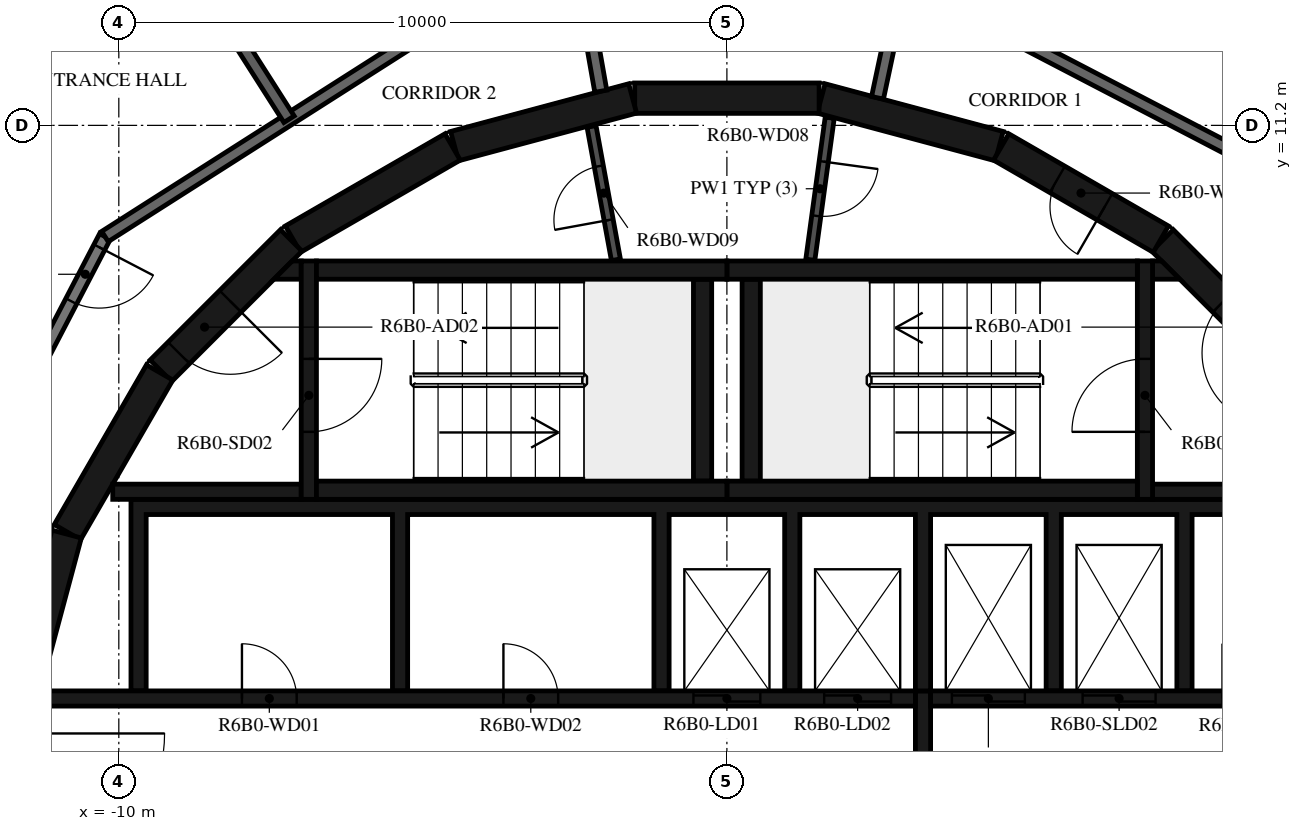
"""IFC4 building model, lengths in metres.
Left out: names, types, materials, properties, quantities, classifications, styles, units other than length and angle.
Written with IfcOpenShell. Run it as: python <this file> out.ifc"""

import sys

from ifc_helpers import new_model, si_unit, direction, frame, frame_2d, origin, place, context, subcontext, project, spatial, polyline, rectangle, outline, extrude, element, fill, save


model = new_model("IFC4")
c1 = context("Model", 3, precision=1e-05, world=origin(), true_north=direction((0.0, 1.0)))
c2 = subcontext(c1, "Body", "Model", "MODEL_VIEW")
j1 = project(units=[si_unit("LENGTHUNIT", "METRE"), si_unit("PLANEANGLEUNIT", "RADIAN")], contexts=[c1])
p1 = place(None, origin())
s1 = spatial("IfcSite", under=j1, at=p1, CompositionType="ELEMENT")
p2 = place(p1, origin())
s2 = spatial("IfcBuilding", under=s1, at=p2, CompositionType="ELEMENT")
p3 = place(p2, frame((0.0, 0.0, 240.7)))
s3 = spatial("IfcBuildingStorey", under=s2, at=p3, CompositionType="ELEMENT", Elevation=240.7)
p4 = place(p3, frame((9.308, 7.164, 0.0), z_axis=(0.0, 0.0, 1.0), x_axis=(-0.707106781187, 0.707106781187, 0.0)))
e1 = element("IfcWall", 1, at=p4, inside=s3, PredefinedType="SHEAR", context=c2, shape_type="SweptSolid", body=[
    extrude(rectangle(XDim=3.032, YDim=0.5, at=frame_2d((1.516, 0.0))), origin(), (0.0, 0.0, 1.0), 3.12),
])
p5 = place(p4, frame((0.416, 0.0, 0.0)))
e2 = element("IfcOpeningElement", 2, at=p5, cuts=e1, PredefinedType="OPENING", context=c2, shape_type="SweptSolid", body=[
    extrude(rectangle(XDim=1.2, YDim=2.1, at=frame_2d((0.6, 1.05))), frame((0.0, 0.26, 0.0), z_axis=(0.0, -1.0, 0.0), x_axis=(1.0, 0.0, 0.0)), (0.0, 0.0, 1.0), 0.52),
])
p6 = place(p3, frame((7.137, 9.329, 0.0), z_axis=(0.0, 0.0, 1.0), x_axis=(-0.865975092491, 0.500087131594, 0.0)))
e3 = element("IfcWall", 3, at=p6, inside=s3, PredefinedType="SHEAR", context=c2, shape_type="SweptSolid", body=[
    extrude(rectangle(XDim=3.033, YDim=0.5, at=frame_2d((1.516, 0.0))), origin(), (0.0, 0.0, 1.0), 3.12),
])
p7 = place(p6, frame((1.066, 0.0, 0.0)))
e4 = element("IfcOpeningElement", 4, at=p7, cuts=e3, PredefinedType="OPENING", context=c2, shape_type="SweptSolid", body=[
    extrude(rectangle(XDim=0.9, YDim=2.1, at=frame_2d((0.45, 1.05))), frame((0.0, 0.26, 0.0), z_axis=(0.0, -1.0, 0.0), x_axis=(1.0, 0.0, 0.0)), (0.0, 0.0, 1.0), 0.52),
])
for number, where, z_axis, x_axis in (
    (5, (4.479, 10.858, 0.0), (0.0, 0.0, 1.0), (-0.966, 0.259, 0.0)),
    (6, (1.516, 11.647, 0.0), (0.0, 0.0, 1.0), (-1.0, 0.0, 0.0)),
    (7, (-1.55, 11.643, 0.0), (0.0, 0.0, 1.0), (-0.966, -0.259, 0.0)),
    (8, (-4.51, 10.845, 0.0), (0.0, 0.0, 1.0), (-0.866, -0.5, 0.0)),
):
    element("IfcWall", number, at=place(p3, frame(where, z_axis=z_axis, x_axis=x_axis)), inside=s3, PredefinedType="SHEAR", context=c2, shape_type="SweptSolid", body=[
        extrude(rectangle(XDim=3.033, YDim=0.5, at=frame_2d((1.516, 0.0))), origin(), (0.0, 0.0, 1.0), 3.12),
    ])
p8 = place(p3, frame((-7.164, 9.308, 0.0), z_axis=(0.0, 0.0, 1.0), x_axis=(-0.707106781187, -0.707106781187, 0.0)))
e9 = element("IfcWall", 9, at=p8, inside=s3, PredefinedType="SHEAR", context=c2, shape_type="SweptSolid", body=[
    extrude(rectangle(XDim=3.032, YDim=0.5, at=frame_2d((1.516, 0.0))), origin(), (0.0, 0.0, 1.0), 3.12),
])
p9 = place(p8, frame((1.416, 0.0, 0.0)))
e10 = element("IfcOpeningElement", 10, at=p9, cuts=e9, PredefinedType="OPENING", context=c2, shape_type="SweptSolid", body=[
    extrude(rectangle(XDim=1.2, YDim=2.1, at=frame_2d((0.6, 1.05))), frame((0.0, 0.26, 0.0), z_axis=(0.0, -1.0, 0.0), x_axis=(1.0, 0.0, 0.0)), (0.0, 0.0, 1.0), 0.52),
])
for number, where, z_axis, x_axis in (
    (11, (-9.329, 7.137, 0.0), (0.0, 0.0, 1.0), (-0.5, -0.866, 0.0)),
    (12, (-10.858, 4.479, 0.0), (0.0, 0.0, 1.0), (-0.259, -0.966, 0.0)),
):
    element("IfcWall", number, at=place(p3, frame(where, z_axis=z_axis, x_axis=x_axis)), inside=s3, PredefinedType="SHEAR", context=c2, shape_type="SweptSolid", body=[
        extrude(rectangle(XDim=3.033, YDim=0.5, at=frame_2d((1.516, 0.0))), origin(), (0.0, 0.0, 1.0), 3.12),
    ])
for number, where, z_axis, x_axis in (
    (13, (0.0, 5.2, 0.0), (0.0, 0.0, 1.0), (1.0, 0.0, 0.0)),
    (14, (0.0, 8.82, 0.0), (0.0, 0.0, 1.0), (1.0, 0.0, 0.0)),
):
    element("IfcWall", number, at=place(p3, frame(where, z_axis=z_axis, x_axis=x_axis)), inside=s3, PredefinedType="SHEAR", context=c2, shape_type="SweptSolid", body=[
        extrude(rectangle(XDim=6.75, YDim=0.3, at=frame_2d((3.375, 0.0))), origin(), (0.0, 0.0, 1.0), 3.12),
    ])
p10 = place(p3, frame((0.4, 5.35, 0.0), z_axis=(0.0, 0.0, 1.0), x_axis=(0.0, 1.0, 0.0)))
e15 = element("IfcWall", 15, at=p10, inside=s3, PredefinedType="SHEAR", context=c2, shape_type="SweptSolid", body=[
    extrude(rectangle(XDim=3.32, YDim=0.3, at=frame_2d((1.66, 0.0))), origin(), (0.0, 0.0, 1.0), 3.12),
])
p11 = place(p3, frame((6.875, 5.05, 0.0), z_axis=(0.0, 0.0, 1.0), x_axis=(0.0, 1.0, 0.0)))
e16 = element("IfcWall", 16, at=p11, inside=s3, PredefinedType="SHEAR", context=c2, shape_type="SweptSolid", body=[
    extrude(rectangle(XDim=3.92, YDim=0.25, at=frame_2d((1.96, 0.0))), origin(), (0.0, 0.0, 1.0), 3.12),
])
p12 = place(p11, frame((1.11, 0.0, 0.0)))
e17 = element("IfcOpeningElement", 17, at=p12, cuts=e16, PredefinedType="OPENING", context=c2, shape_type="SweptSolid", body=[
    extrude(rectangle(XDim=1.2, YDim=2.1, at=frame_2d((0.6, 1.05))), frame((0.0, 0.135, 0.0), z_axis=(0.0, -1.0, 0.0), x_axis=(1.0, 0.0, 0.0)), (0.0, 0.0, 1.0), 0.27),
])
p13 = place(p3, frame((7.0, 5.175, 0.0), z_axis=(0.0, 0.0, 1.0), x_axis=(1.0, 0.0, 0.0)))
e18 = element("IfcWall", 18, at=p13, inside=s3, PredefinedType="SHEAR", context=c2, shape_type="SweptSolid", body=[
    extrude(rectangle(XDim=3.1, YDim=0.25, at=frame_2d((1.55, 0.0))), origin(), (0.0, 0.0, 1.0), 3.12),
])
p14 = place(p3, origin())
e19 = element("IfcWall", 19, at=p14, inside=s3, PredefinedType="SHEAR", context=c2, shape_type="SweptSolid", body=[
    extrude(outline(polyline([(7.448, 8.67), (7.0, 8.67), (7.0, 8.97), (7.148, 8.97), (7.448, 8.67)])), origin(), (0.0, 0.0, 1.0), 3.12),
])
for number, where, z_axis, x_axis in (
    (20, (-6.75, 5.2, 0.0), (0.0, 0.0, 1.0), (1.0, 0.0, 0.0)),
    (21, (-6.75, 8.82, 0.0), (0.0, 0.0, 1.0), (1.0, 0.0, 0.0)),
):
    element("IfcWall", number, at=place(p3, frame(where, z_axis=z_axis, x_axis=x_axis)), inside=s3, PredefinedType="SHEAR", context=c2, shape_type="SweptSolid", body=[
        extrude(rectangle(XDim=6.75, YDim=0.3, at=frame_2d((3.375, 0.0))), origin(), (0.0, 0.0, 1.0), 3.12),
    ])
p15 = place(p3, frame((-0.4, 5.35, 0.0), z_axis=(0.0, 0.0, 1.0), x_axis=(0.0, 1.0, 0.0)))
e22 = element("IfcWall", 22, at=p15, inside=s3, PredefinedType="SHEAR", context=c2, shape_type="SweptSolid", body=[
    extrude(rectangle(XDim=3.32, YDim=0.3, at=frame_2d((1.66, 0.0))), origin(), (0.0, 0.0, 1.0), 3.12),
])
p16 = place(p3, frame((-6.875, 8.97, 0.0), z_axis=(0.0, 0.0, 1.0), x_axis=(0.0, -1.0, 0.0)))
e23 = element("IfcWall", 23, at=p16, inside=s3, PredefinedType="SHEAR", context=c2, shape_type="SweptSolid", body=[
    extrude(rectangle(XDim=3.92, YDim=0.25, at=frame_2d((1.96, 0.0))), origin(), (0.0, 0.0, 1.0), 3.12),
])
p17 = place(p16, frame((1.61, 0.0, 0.0)))
e24 = element("IfcOpeningElement", 24, at=p17, cuts=e23, PredefinedType="OPENING", context=c2, shape_type="SweptSolid", body=[
    extrude(rectangle(XDim=1.2, YDim=2.1, at=frame_2d((0.6, 1.05))), frame((0.0, 0.135, 0.0), z_axis=(0.0, -1.0, 0.0), x_axis=(1.0, 0.0, 0.0)), (0.0, 0.0, 1.0), 0.27),
])
p18 = place(p3, frame((-7.0, 5.175, 0.0), z_axis=(0.0, 0.0, 1.0), x_axis=(-1.0, 0.0, 0.0)))
e25 = element("IfcWall", 25, at=p18, inside=s3, PredefinedType="SHEAR", context=c2, shape_type="SweptSolid", body=[
    extrude(rectangle(XDim=3.1, YDim=0.25, at=frame_2d((1.55, 0.0))), origin(), (0.0, 0.0, 1.0), 3.12),
])
p19 = place(p3, origin())
e26 = element("IfcWall", 26, at=p19, inside=s3, PredefinedType="SHEAR", context=c2, shape_type="SweptSolid", body=[
    extrude(outline(polyline([(-7.148, 8.97), (-7.0, 8.97), (-7.0, 8.67), (-7.448, 8.67), (-7.148, 8.97)])), origin(), (0.0, 0.0, 1.0), 3.12),
])
p20 = place(p3, origin())
e27 = element("IfcWall", 27, at=p20, inside=s3, PredefinedType="SHEAR", context=c2, shape_type="SweptSolid", body=[
    extrude(outline(polyline([(-9.55, 4.8), (-5.5, 4.8), (-5.5, 1.9), (-5.25, 1.9), (-5.25, 4.8), (-1.2, 4.8), (-1.2, 1.9), (-0.95, 1.9), (-0.95, 4.8), (0.95, 4.8), (0.95, 1.9), (1.2, 1.9), (1.2, 4.8), (3.1, 4.8), (3.1, 1.9), (3.35, 1.9), (3.35, 4.8), (5.25, 4.8), (5.25, 1.9), (5.5, 1.9), (5.5, 4.8), (7.4, 4.8), (7.4, 1.9), (7.65, 1.9), (7.65, 4.8), (9.55, 4.8), (9.55, 1.9), (9.8, 1.9), (9.8, 4.8), (9.8, 5.05), (-9.8, 5.05), (-9.8, 4.8), (-9.8, 1.9), (-9.55, 1.9), (-9.55, 4.8)])), origin(), (0.0, 0.0, 1.0), 3.12),
])
p21 = place(p3, frame((-11.28, 1.775, 0.0), z_axis=(0.0, 0.0, 1.0), x_axis=(1.0, 0.0, 0.0)))
e28 = element("IfcWall", 28, at=p21, inside=s3, PredefinedType="SHEAR", context=c2, shape_type="SweptSolid", body=[
    extrude(rectangle(XDim=14.38, YDim=0.25, at=frame_2d((7.19, 0.0))), origin(), (0.0, 0.0, 1.0), 3.12),
])
p22 = place(p21, frame((10.73, 0.0, 0.0)))
e29 = element("IfcOpeningElement", 29, at=p22, cuts=e28, PredefinedType="OPENING", context=c2, shape_type="SweptSolid", body=[
    extrude(rectangle(XDim=1.1, YDim=2.1, at=frame_2d((0.55, 1.05))), frame((0.0, 0.135, 0.0), z_axis=(0.0, -1.0, 0.0), x_axis=(1.0, 0.0, 0.0)), (0.0, 0.0, 1.0), 0.27),
])
p23 = place(p21, frame((12.88, 0.0, 0.0)))
e30 = element("IfcOpeningElement", 30, at=p23, cuts=e28, PredefinedType="OPENING", context=c2, shape_type="SweptSolid", body=[
    extrude(rectangle(XDim=1.1, YDim=2.1, at=frame_2d((0.55, 1.05))), frame((0.0, 0.135, 0.0), z_axis=(0.0, -1.0, 0.0), x_axis=(1.0, 0.0, 0.0)), (0.0, 0.0, 1.0), 0.27),
])
p24 = place(p21, frame((3.305, 0.0, 0.0)))
e31 = element("IfcOpeningElement", 31, at=p24, cuts=e28, PredefinedType="OPENING", context=c2, shape_type="SweptSolid", body=[
    extrude(rectangle(XDim=0.9, YDim=2.1, at=frame_2d((0.45, 1.05))), frame((0.0, 0.135, 0.0), z_axis=(0.0, -1.0, 0.0), x_axis=(1.0, 0.0, 0.0)), (0.0, 0.0, 1.0), 0.27),
])
p25 = place(p21, frame((7.605, 0.0, 0.0)))
e32 = element("IfcOpeningElement", 32, at=p25, cuts=e28, PredefinedType="OPENING", context=c2, shape_type="SweptSolid", body=[
    extrude(rectangle(XDim=0.9, YDim=2.1, at=frame_2d((0.45, 1.05))), frame((0.0, 0.135, 0.0), z_axis=(0.0, -1.0, 0.0), x_axis=(1.0, 0.0, 0.0)), (0.0, 0.0, 1.0), 0.27),
])
p26 = place(p3, frame((3.35, 1.775, 0.0), z_axis=(0.0, 0.0, 1.0), x_axis=(1.0, 0.0, 0.0)))
e33 = element("IfcWall", 33, at=p26, inside=s3, PredefinedType="SHEAR", context=c2, shape_type="SweptSolid", body=[
    extrude(rectangle(XDim=7.93, YDim=0.25, at=frame_2d((3.965, 0.0))), origin(), (0.0, 0.0, 1.0), 3.12),
])
p27 = place(p26, frame((0.35, 0.0, 0.0)))
e34 = element("IfcOpeningElement", 34, at=p27, cuts=e33, PredefinedType="OPENING", context=c2, shape_type="SweptSolid", body=[
    extrude(rectangle(XDim=1.2, YDim=2.4, at=frame_2d((0.6, 1.2))), frame((0.0, 0.135, 0.0), z_axis=(0.0, -1.0, 0.0), x_axis=(1.0, 0.0, 0.0)), (0.0, 0.0, 1.0), 0.27),
])
p28 = place(p26, frame((2.5, 0.0, 0.0)))
e35 = element("IfcOpeningElement", 35, at=p28, cuts=e33, PredefinedType="OPENING", context=c2, shape_type="SweptSolid", body=[
    extrude(rectangle(XDim=1.2, YDim=2.4, at=frame_2d((0.6, 1.2))), frame((0.0, 0.135, 0.0), z_axis=(0.0, -1.0, 0.0), x_axis=(1.0, 0.0, 0.0)), (0.0, 0.0, 1.0), 0.27),
])
p29 = place(p26, frame((4.8, 0.0, 0.0)))
e36 = element("IfcOpeningElement", 36, at=p29, cuts=e33, PredefinedType="OPENING", context=c2, shape_type="SweptSolid", body=[
    extrude(rectangle(XDim=0.9, YDim=2.1, at=frame_2d((0.45, 1.05))), frame((0.0, 0.135, 0.0), z_axis=(0.0, -1.0, 0.0), x_axis=(1.0, 0.0, 0.0)), (0.0, 0.0, 1.0), 0.27),
])
p30 = place(p3, frame((3.225, -1.9, 0.0), z_axis=(0.0, 0.0, 1.0), x_axis=(0.0, 1.0, 0.0)))
e37 = element("IfcWall", 37, at=p30, inside=s3, PredefinedType="SHEAR", context=c2, shape_type="SweptSolid", body=[
    extrude(rectangle(XDim=3.8, YDim=0.25, at=frame_2d((1.9, 0.0))), origin(), (0.0, 0.0, 1.0), 3.12),
])
p31 = place(p3, frame((1.691, 11.326, 0.0), z_axis=(0.0, 0.0, 1.0), x_axis=(-0.135344253201, -0.990798633994, 0.0)))
e38 = element("IfcWall", 38, at=p31, inside=s3, PredefinedType="PARTITIONING", context=c2, shape_type="SweptSolid", body=[
    extrude(rectangle(XDim=2.358, YDim=0.15, at=frame_2d((1.179, 0.0))), origin(), (0.0, 0.0, 1.0), 3.12),
])
p32 = place(p31, frame((0.729, 0.0, 0.0)))
e39 = element("IfcOpeningElement", 39, at=p32, cuts=e38, PredefinedType="OPENING", context=c2, shape_type="SweptSolid", body=[
    extrude(rectangle(XDim=0.9, YDim=2.1, at=frame_2d((0.45, 1.05))), frame((0.0, 0.085, 0.0), z_axis=(0.0, -1.0, 0.0), x_axis=(1.0, 0.0, 0.0)), (0.0, 0.0, 1.0), 0.17),
])
p33 = place(p3, frame((-1.825, 8.99, 0.0), z_axis=(0.0, 0.0, 1.0), x_axis=(-0.179955206115, 0.983674805915, 0.0)))
e40 = element("IfcWall", 40, at=p33, inside=s3, PredefinedType="PARTITIONING", context=c2, shape_type="SweptSolid", body=[
    extrude(rectangle(XDim=2.229, YDim=0.15, at=frame_2d((1.115, 0.0))), origin(), (0.0, 0.0, 1.0), 3.12),
])
p34 = place(p33, frame((0.665, 0.0, 0.0)))
e41 = element("IfcOpeningElement", 41, at=p34, cuts=e40, PredefinedType="OPENING", context=c2, shape_type="SweptSolid", body=[
    extrude(rectangle(XDim=0.9, YDim=2.1, at=frame_2d((0.45, 1.05))), frame((0.0, 0.085, 0.0), z_axis=(0.0, -1.0, 0.0), x_axis=(1.0, 0.0, 0.0)), (0.0, 0.0, 1.0), 0.17),
])
p35 = place(p3, frame((9.372, 10.228, 0.0), z_axis=(0.0, 0.0, 1.0), x_axis=(-0.887005184532, 0.461759464021, 0.0)))
e42 = element("IfcWall", 42, at=p35, inside=s3, PredefinedType="STANDARD", context=c2, shape_type="SweptSolid", body=[
    extrude(rectangle(XDim=7.181, YDim=0.2, at=frame_2d((3.591, 0.0))), origin(), (0.0, 0.0, 1.0), 3.12),
])
p36 = place(p3, frame((2.878, 13.538, 0.0), z_axis=(0.0, 0.0, 1.0), x_axis=(-0.207893604596, -0.978151444904, 0.0)))
e43 = element("IfcWall", 43, at=p36, inside=s3, PredefinedType="STANDARD", context=c2, shape_type="SweptSolid", body=[
    extrude(rectangle(XDim=1.927, YDim=0.2, at=frame_2d((0.963, 0.0))), origin(), (0.0, 0.0, 1.0), 3.12),
])
p37 = place(p3, frame((-10.228, 9.372, 0.0), z_axis=(0.0, 0.0, 1.0), x_axis=(-0.461759464021, -0.887005184532, 0.0)))
e44 = element("IfcWall", 44, at=p37, inside=s3, PredefinedType="STANDARD", context=c2, shape_type="SweptSolid", body=[
    extrude(rectangle(XDim=7.181, YDim=0.2, at=frame_2d((3.591, 0.0))), origin(), (0.0, 0.0, 1.0), 3.12),
])
p38 = place(p37, frame((0.2, 0.0, 0.0)))
e45 = element("IfcOpeningElement", 45, at=p38, cuts=e44, PredefinedType="OPENING", context=c2, shape_type="SweptSolid", body=[
    extrude(rectangle(XDim=1.0, YDim=2.1, at=frame_2d((0.5, 1.05))), frame((0.0, 0.11, 0.0), z_axis=(0.0, -1.0, 0.0), x_axis=(1.0, 0.0, 0.0)), (0.0, 0.0, 1.0), 0.22),
])
p39 = place(p3, frame((-2.074, 11.761, 0.0), z_axis=(0.0, 0.0, 1.0), x_axis=(-0.173679082312, 0.984802303189, 0.0)))
e46 = element("IfcWall", 46, at=p39, inside=s3, PredefinedType="STANDARD", context=c2, shape_type="SweptSolid", body=[
    extrude(rectangle(XDim=1.573, YDim=0.2, at=frame_2d((0.787, 0.0))), origin(), (0.0, 0.0, 1.0), 3.12),
])
p40 = place(p3, frame((-4.172, 13.231, 0.0), z_axis=(0.0, 0.0, 1.0), x_axis=(-0.843388394728, -0.537304397561, 0.0)))
e47 = element("IfcWall", 47, at=p40, inside=s3, PredefinedType="STANDARD", context=c2, shape_type="SweptSolid", body=[
    extrude(rectangle(XDim=7.181, YDim=0.2, at=frame_2d((3.59, 0.0))), origin(), (0.0, 0.0, 1.0), 3.12),
])
p41 = place(p3, frame((-9.645, 15.138, 0.0), z_axis=(0.0, 0.0, 1.0), x_axis=(0.537267800866, -0.84341170857, 0.0)))
e48 = element("IfcWall", 48, at=p41, inside=s3, PredefinedType="STANDARD", context=c2, shape_type="SweptSolid", body=[
    extrude(rectangle(XDim=4.55, YDim=0.2, at=frame_2d((2.275, 0.0))), origin(), (0.0, 0.0, 1.0), 3.12),
])
p42 = place(p3, frame((10.421, 11.373, 0.0), z_axis=(0.0, 0.0, 1.0), x_axis=(-0.887012970857, 0.461744506769, 0.0)))
e49 = element("IfcWall", 49, at=p42, inside=s3, PredefinedType="PARTITIONING", context=c2, shape_type="SweptSolid", body=[
    extrude(rectangle(XDim=7.985, YDim=0.12, at=frame_2d((3.992, 0.0))), origin(), (0.0, 0.0, 1.0), 3.12),
])
p43 = place(p12, origin())
e50 = element("IfcDoor", 50, at=p43, inside=s3, OperationType="SINGLE_SWING_LEFT", PredefinedType="DOOR", context=c2, shape_type="SweptSolid", body=[
    extrude(rectangle(XDim=1.2, YDim=2.1, at=frame_2d((0.6, 1.05))), frame((0.0, 0.025, 0.0), z_axis=(0.0, -1.0, 0.0), x_axis=(1.0, 0.0, 0.0)), (0.0, 0.0, 1.0), 0.05),
])
fill(e17, e50)
p44 = place(p5, origin())
e51 = element("IfcDoor", 51, at=p44, inside=s3, OperationType="SINGLE_SWING_RIGHT", PredefinedType="DOOR", context=c2, shape_type="SweptSolid", body=[
    extrude(rectangle(XDim=1.2, YDim=2.1, at=frame_2d((0.6, 1.05))), frame((0.0, 0.025, 0.0), z_axis=(0.0, -1.0, 0.0), x_axis=(1.0, 0.0, 0.0)), (0.0, 0.0, 1.0), 0.05),
])
fill(e2, e51)
p45 = place(p17, origin())
e52 = element("IfcDoor", 52, at=p45, inside=s3, OperationType="SINGLE_SWING_LEFT", PredefinedType="DOOR", context=c2, shape_type="SweptSolid", body=[
    extrude(rectangle(XDim=1.2, YDim=2.1, at=frame_2d((0.6, 1.05))), frame((0.0, 0.025, 0.0), z_axis=(0.0, -1.0, 0.0), x_axis=(1.0, 0.0, 0.0)), (0.0, 0.0, 1.0), 0.05),
])
fill(e24, e52)
p46 = place(p9, origin())
e53 = element("IfcDoor", 53, at=p46, inside=s3, OperationType="SINGLE_SWING_RIGHT", PredefinedType="DOOR", context=c2, shape_type="SweptSolid", body=[
    extrude(rectangle(XDim=1.2, YDim=2.1, at=frame_2d((0.6, 1.05))), frame((0.0, 0.025, 0.0), z_axis=(0.0, -1.0, 0.0), x_axis=(1.0, 0.0, 0.0)), (0.0, 0.0, 1.0), 0.05),
])
fill(e10, e53)
p47 = place(p22, origin())
e54 = element("IfcDoor", 54, at=p47, inside=s3, OperationType="DOUBLE_DOOR_SLIDING", PredefinedType="DOOR", context=c2, shape_type="SweptSolid", body=[
    extrude(rectangle(XDim=1.1, YDim=2.1, at=frame_2d((0.55, 1.05))), frame((0.0, 0.025, 0.0), z_axis=(0.0, -1.0, 0.0), x_axis=(1.0, 0.0, 0.0)), (0.0, 0.0, 1.0), 0.05),
])
fill(e29, e54)
p48 = place(p23, origin())
e55 = element("IfcDoor", 55, at=p48, inside=s3, OperationType="DOUBLE_DOOR_SLIDING", PredefinedType="DOOR", context=c2, shape_type="SweptSolid", body=[
    extrude(rectangle(XDim=1.1, YDim=2.1, at=frame_2d((0.55, 1.05))), frame((0.0, 0.025, 0.0), z_axis=(0.0, -1.0, 0.0), x_axis=(1.0, 0.0, 0.0)), (0.0, 0.0, 1.0), 0.05),
])
fill(e30, e55)
p49 = place(p27, origin())
e56 = element("IfcDoor", 56, at=p49, inside=s3, OperationType="DOUBLE_DOOR_SLIDING", PredefinedType="DOOR", context=c2, shape_type="SweptSolid", body=[
    extrude(rectangle(XDim=1.2, YDim=2.4, at=frame_2d((0.6, 1.2))), frame((0.0, 0.025, 0.0), z_axis=(0.0, -1.0, 0.0), x_axis=(1.0, 0.0, 0.0)), (0.0, 0.0, 1.0), 0.05),
])
fill(e34, e56)
p50 = place(p28, origin())
e57 = element("IfcDoor", 57, at=p50, inside=s3, OperationType="DOUBLE_DOOR_SLIDING", PredefinedType="DOOR", context=c2, shape_type="SweptSolid", body=[
    extrude(rectangle(XDim=1.2, YDim=2.4, at=frame_2d((0.6, 1.2))), frame((0.0, 0.025, 0.0), z_axis=(0.0, -1.0, 0.0), x_axis=(1.0, 0.0, 0.0)), (0.0, 0.0, 1.0), 0.05),
])
fill(e35, e57)
p51 = place(p24, origin())
e58 = element("IfcDoor", 58, at=p51, inside=s3, OperationType="SINGLE_SWING_LEFT", PredefinedType="DOOR", context=c2, shape_type="SweptSolid", body=[
    extrude(rectangle(XDim=0.9, YDim=2.1, at=frame_2d((0.45, 1.05))), frame((0.0, 0.025, 0.0), z_axis=(0.0, -1.0, 0.0), x_axis=(1.0, 0.0, 0.0)), (0.0, 0.0, 1.0), 0.05),
])
fill(e31, e58)
p52 = place(p25, origin())
e59 = element("IfcDoor", 59, at=p52, inside=s3, OperationType="SINGLE_SWING_RIGHT", PredefinedType="DOOR", context=c2, shape_type="SweptSolid", body=[
    extrude(rectangle(XDim=0.9, YDim=2.1, at=frame_2d((0.45, 1.05))), frame((0.0, 0.025, 0.0), z_axis=(0.0, -1.0, 0.0), x_axis=(1.0, 0.0, 0.0)), (0.0, 0.0, 1.0), 0.05),
])
fill(e32, e59)
p53 = place(p32, origin())
e60 = element("IfcDoor", 60, at=p53, inside=s3, OperationType="SINGLE_SWING_RIGHT", PredefinedType="DOOR", context=c2, shape_type="SweptSolid", body=[
    extrude(rectangle(XDim=0.9, YDim=2.1, at=frame_2d((0.45, 1.05))), frame((0.0, 0.025, 0.0), z_axis=(0.0, -1.0, 0.0), x_axis=(1.0, 0.0, 0.0)), (0.0, 0.0, 1.0), 0.05),
])
fill(e39, e60)
p54 = place(p34, origin())
e61 = element("IfcDoor", 61, at=p54, inside=s3, OperationType="SINGLE_SWING_LEFT", PredefinedType="DOOR", context=c2, shape_type="SweptSolid", body=[
    extrude(rectangle(XDim=0.9, YDim=2.1, at=frame_2d((0.45, 1.05))), frame((0.0, 0.025, 0.0), z_axis=(0.0, -1.0, 0.0), x_axis=(1.0, 0.0, 0.0)), (0.0, 0.0, 1.0), 0.05),
])
fill(e41, e61)
p55 = place(p7, origin())
e62 = element("IfcDoor", 62, at=p55, inside=s3, OperationType="SINGLE_SWING_RIGHT", PredefinedType="DOOR", context=c2, shape_type="SweptSolid", body=[
    extrude(rectangle(XDim=0.9, YDim=2.1, at=frame_2d((0.45, 1.05))), frame((0.0, 0.025, 0.0), z_axis=(0.0, -1.0, 0.0), x_axis=(1.0, 0.0, 0.0)), (0.0, 0.0, 1.0), 0.05),
])
fill(e4, e62)
p56 = place(p38, origin())
e63 = element("IfcDoor", 63, at=p56, inside=s3, OperationType="SINGLE_SWING_LEFT", PredefinedType="DOOR", context=c2, shape_type="SweptSolid", body=[
    extrude(rectangle(XDim=1.0, YDim=2.1, at=frame_2d((0.5, 1.05))), frame((0.0, 0.025, 0.0), z_axis=(0.0, -1.0, 0.0), x_axis=(1.0, 0.0, 0.0)), (0.0, 0.0, 1.0), 0.05),
])
fill(e45, e63)
save(model, sys.argv[1])
